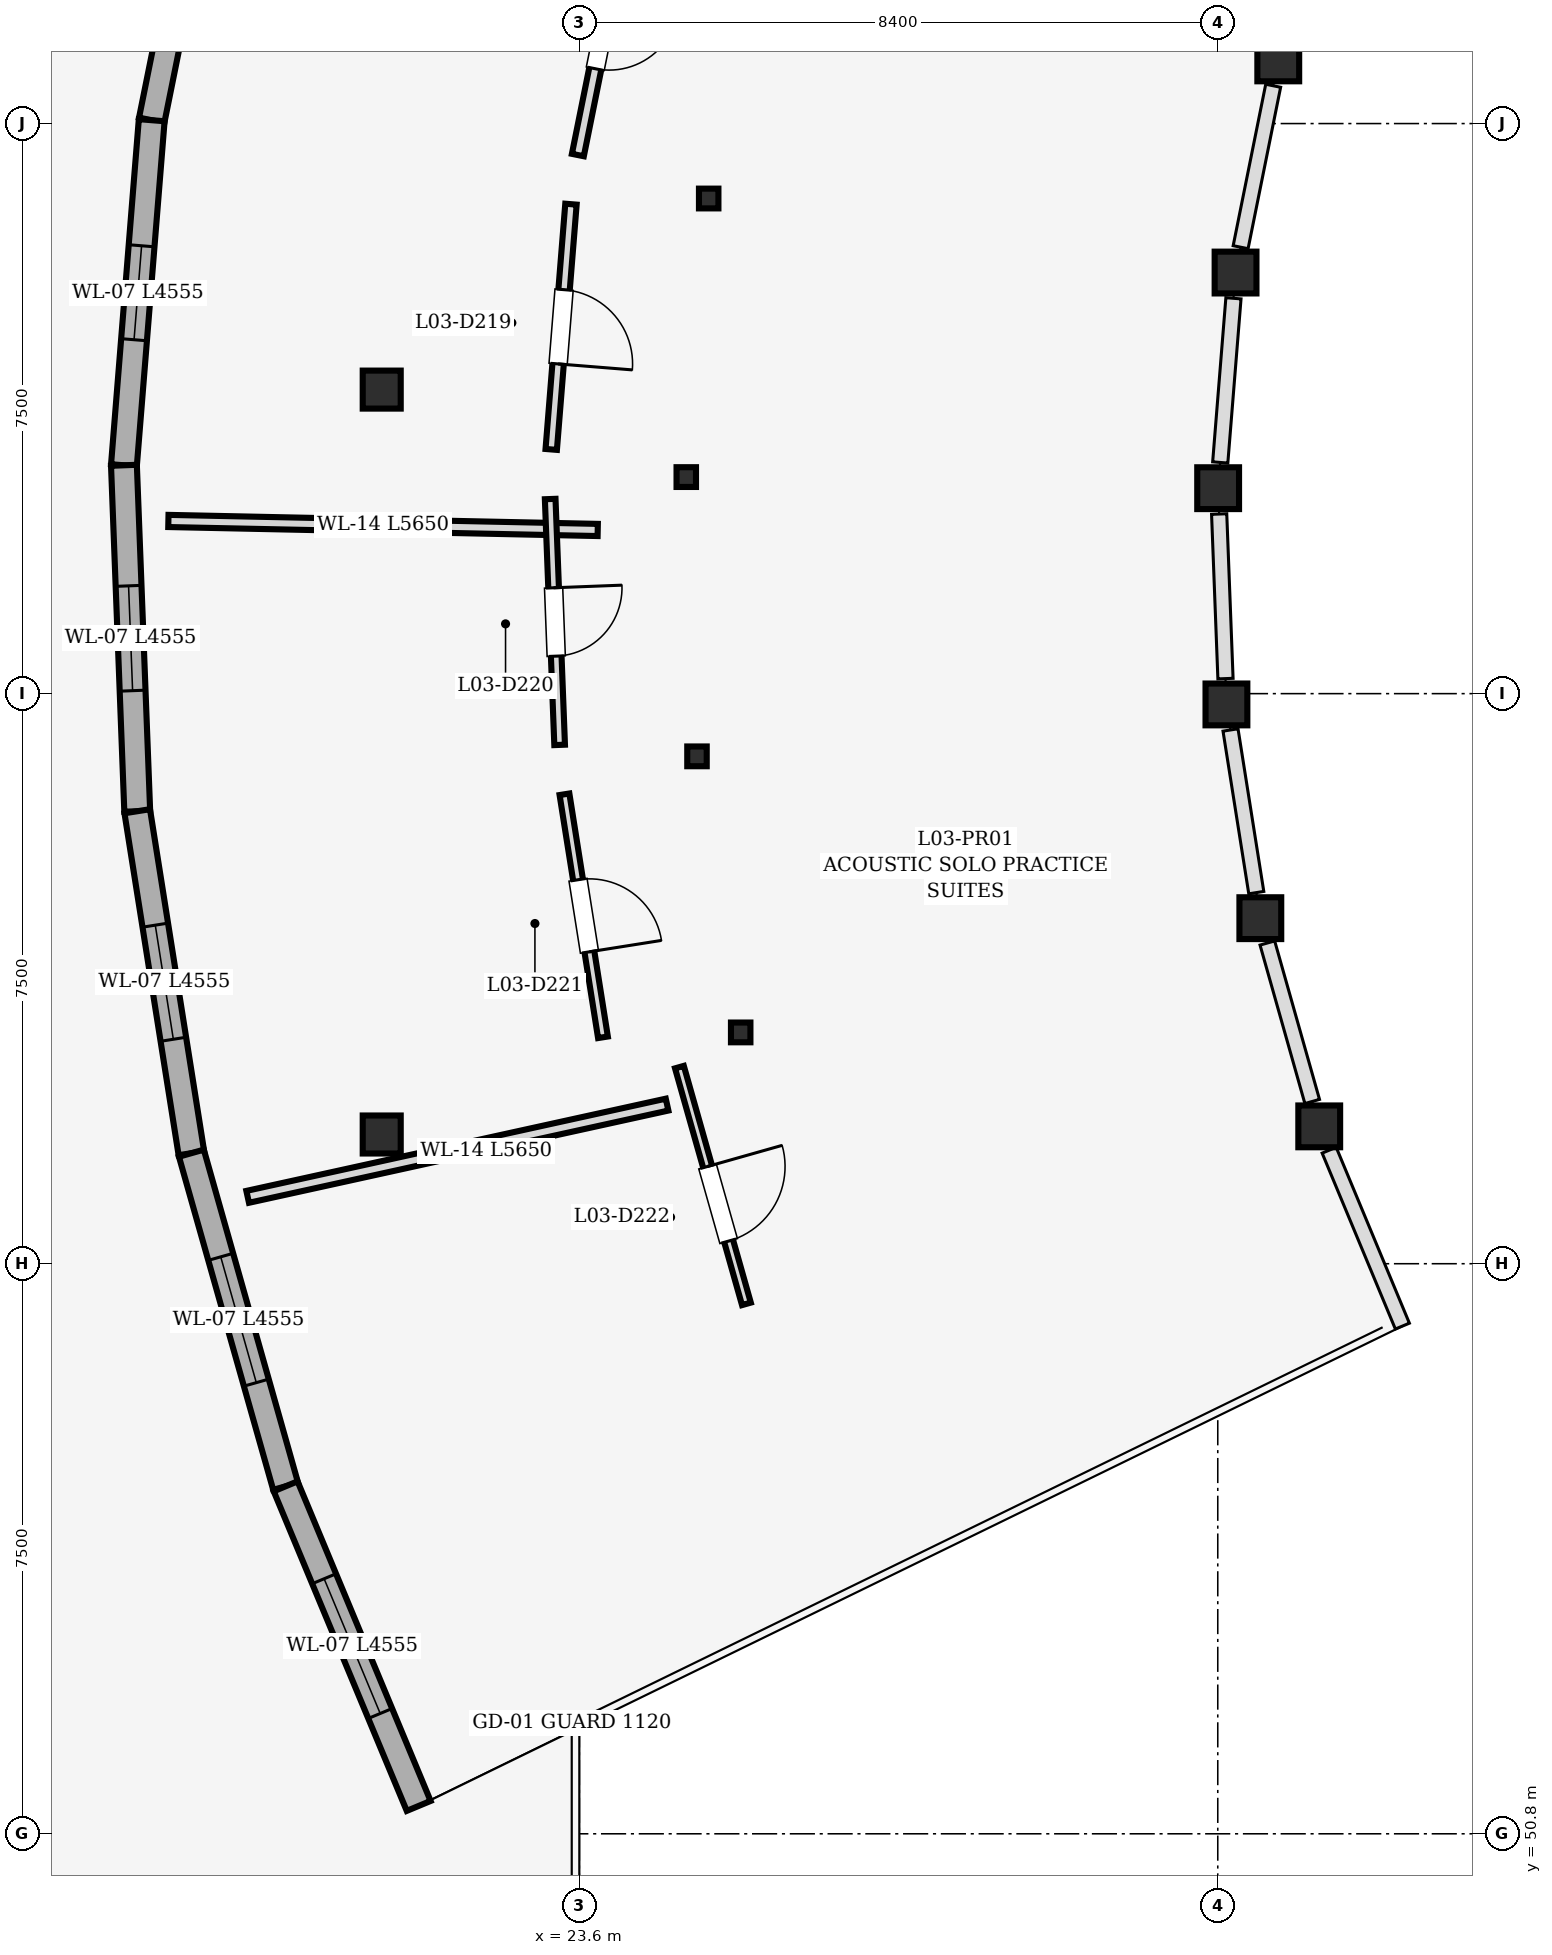
"""IFC4 building model, lengths in metres.
Left out: names, types, materials, properties, quantities, classifications, styles, units other than length and angle.
Written with IfcOpenShell. Run it as: python <this file> out.ifc"""

import sys

from ifc_helpers import new_model, si_unit, direction, frame, frame_2d, origin, origin_2d, place, context, subcontext, project, spatial, rectangle, i_section, extrude, element, fill, save


model = new_model("IFC4")
c1 = context("Model", 3, precision=1e-05, world=origin(), true_north=direction((0.0, 1.0)))
c2 = subcontext(c1, "Body", "Model", "MODEL_VIEW")
j1 = project(units=[si_unit("LENGTHUNIT", "METRE"), si_unit("PLANEANGLEUNIT", "RADIAN")], contexts=[c1])
p1 = place(None, origin())
s1 = spatial("IfcSite", under=j1, at=p1, CompositionType="ELEMENT")
p2 = place(p1, origin())
s2 = spatial("IfcBuilding", under=s1, at=p2, CompositionType="ELEMENT")
p3 = place(p2, frame((0.0, 0.0, 10.2)))
s3 = spatial("IfcBuildingStorey", under=s2, at=p3, CompositionType="ELEMENT", Elevation=10.2)
for number, where, z_axis, x_axis in (
    (1, (32.796, 74.131, 0.0), (0.0, 0.0, 1.0), (1.0, 0.0, 0.0)),
    (2, (32.234, 71.34, 0.0), (0.0, 0.0, 1.0), (1.0, 0.0, 0.0)),
):
    element("IfcColumn", number, at=place(p3, frame(where, z_axis=z_axis, x_axis=x_axis)), inside=s3, PredefinedType="COLUMN", context=c2, shape_type="SweptSolid", body=[
        extrude(rectangle(XDim=0.55, YDim=0.55, at=origin_2d()), origin(), (0.0, 0.0, 1.0), 4.5),
    ])
p4 = place(p3, frame((25.302, 72.314, 0.0), z_axis=(0.0, 0.0, 1.0), x_axis=(1.0, 0.0, 0.0)))
e3 = element("IfcColumn", 3, at=p4, inside=s3, PredefinedType="COLUMN", context=c2, shape_type="SweptSolid", body=[
    extrude(i_section(OverallWidth=0.256, OverallDepth=0.26, WebThickness=0.01, FlangeThickness=0.017, at=origin_2d()), origin(), (0.0, 0.0, 1.0), 4.5),
])
p5 = place(p3, frame((32.005, 68.503, 0.0), z_axis=(0.0, 0.0, 1.0), x_axis=(1.0, 0.0, 0.0)))
e4 = element("IfcColumn", 4, at=p5, inside=s3, PredefinedType="COLUMN", context=c2, shape_type="SweptSolid", body=[
    extrude(rectangle(XDim=0.55, YDim=0.55, at=origin_2d()), origin(), (0.0, 0.0, 1.0), 4.5),
])
p6 = place(p3, frame((25.007, 68.649, 0.0), z_axis=(0.0, 0.0, 1.0), x_axis=(1.0, 0.0, 0.0)))
e5 = element("IfcColumn", 5, at=p6, inside=s3, PredefinedType="COLUMN", context=c2, shape_type="SweptSolid", body=[
    extrude(i_section(OverallWidth=0.256, OverallDepth=0.26, WebThickness=0.01, FlangeThickness=0.017, at=origin_2d()), origin(), (0.0, 0.0, 1.0), 4.5),
])
p7 = place(p3, frame((32.114, 65.658, 0.0), z_axis=(0.0, 0.0, 1.0), x_axis=(1.0, 0.0, 0.0)))
e6 = element("IfcColumn", 6, at=p7, inside=s3, PredefinedType="COLUMN", context=c2, shape_type="SweptSolid", body=[
    extrude(rectangle(XDim=0.55, YDim=0.55, at=origin_2d()), origin(), (0.0, 0.0, 1.0), 4.5),
])
p8 = place(p3, frame((25.148, 64.975, 0.0), z_axis=(0.0, 0.0, 1.0), x_axis=(1.0, 0.0, 0.0)))
e7 = element("IfcColumn", 7, at=p8, inside=s3, PredefinedType="COLUMN", context=c2, shape_type="SweptSolid", body=[
    extrude(i_section(OverallWidth=0.256, OverallDepth=0.26, WebThickness=0.01, FlangeThickness=0.017, at=origin_2d()), origin(), (0.0, 0.0, 1.0), 4.5),
])
p9 = place(p3, frame((32.56, 62.846, 0.0), z_axis=(0.0, 0.0, 1.0), x_axis=(1.0, 0.0, 0.0)))
e8 = element("IfcColumn", 8, at=p9, inside=s3, PredefinedType="COLUMN", context=c2, shape_type="SweptSolid", body=[
    extrude(rectangle(XDim=0.55, YDim=0.55, at=origin_2d()), origin(), (0.0, 0.0, 1.0), 4.5),
])
p10 = place(p3, frame((25.723, 61.343, 0.0), z_axis=(0.0, 0.0, 1.0), x_axis=(1.0, 0.0, 0.0)))
e9 = element("IfcColumn", 9, at=p10, inside=s3, PredefinedType="COLUMN", context=c2, shape_type="SweptSolid", body=[
    extrude(i_section(OverallWidth=0.256, OverallDepth=0.26, WebThickness=0.01, FlangeThickness=0.017, at=origin_2d()), origin(), (0.0, 0.0, 1.0), 4.5),
])
p11 = place(p3, frame((33.335, 60.107, 0.0), z_axis=(0.0, 0.0, 1.0), x_axis=(1.0, 0.0, 0.0)))
e10 = element("IfcColumn", 10, at=p11, inside=s3, PredefinedType="COLUMN", context=c2, shape_type="SweptSolid", body=[
    extrude(rectangle(XDim=0.55, YDim=0.55, at=origin_2d()), origin(), (0.0, 0.0, 1.0), 4.5),
])
for number, where, z_axis, x_axis in (
    (11, (21.0, 60.0, 0.0), (0.0, 0.0, 1.0), (1.0, 0.0, 0.0)),
    (12, (21.0, 69.8, 0.0), (0.0, 0.0, 1.0), (1.0, 0.0, 0.0)),
):
    element("IfcColumn", number, at=place(p3, frame(where, z_axis=z_axis, x_axis=x_axis)), inside=s3, PredefinedType="COLUMN", context=c2, shape_type="SweptSolid", body=[
        extrude(rectangle(XDim=0.5, YDim=0.5, at=origin_2d()), origin(), (0.0, 0.0, 1.0), 4.5),
    ])
p12 = place(p3, frame((18.874, 77.809, 0.0), z_axis=(0.0, 0.0, 1.0), x_axis=(-0.197682700785, -0.980266060726, 0.0)))
e13 = element("IfcWall", 13, at=p12, inside=s3, PredefinedType="STANDARD", context=c2, shape_type="SweptSolid", body=[
    extrude(rectangle(XDim=4.555, YDim=0.34, at=frame_2d((2.277, 0.0))), origin(), (0.0, 0.0, 1.0), 4.225),
])
p13 = place(p12, frame((1.717, 0.0, 0.85)))
e14 = element("IfcOpeningElement", 14, at=p13, cuts=e13, PredefinedType="OPENING", context=c2, shape_type="SweptSolid", body=[
    extrude(rectangle(XDim=1.12, YDim=1.75, at=frame_2d((0.56, 0.875))), frame((0.0, 0.182, 0.0), z_axis=(0.0, -1.0, 0.0), x_axis=(1.0, 0.0, 0.0)), (0.0, 0.0, 1.0), 0.364),
])
p14 = place(p3, frame((17.974, 73.344, 0.0), z_axis=(0.0, 0.0, 1.0), x_axis=(-0.080188345633, -0.996779729541, 0.0)))
e15 = element("IfcWall", 15, at=p14, inside=s3, PredefinedType="STANDARD", context=c2, shape_type="SweptSolid", body=[
    extrude(rectangle(XDim=4.555, YDim=0.34, at=frame_2d((2.277, 0.0))), origin(), (0.0, 0.0, 1.0), 4.225),
])
p15 = place(p14, frame((1.657, 0.0, 0.85)))
e16 = element("IfcOpeningElement", 16, at=p15, cuts=e15, PredefinedType="OPENING", context=c2, shape_type="SweptSolid", body=[
    extrude(rectangle(XDim=1.24, YDim=1.75, at=frame_2d((0.62, 0.875))), frame((0.0, 0.182, 0.0), z_axis=(0.0, -1.0, 0.0), x_axis=(1.0, 0.0, 0.0)), (0.0, 0.0, 1.0), 0.364),
])
p16 = place(p3, frame((17.608, 68.804, 0.0), z_axis=(0.0, 0.0, 1.0), x_axis=(0.038377542804, -0.999263310749, 0.0)))
e17 = element("IfcWall", 17, at=p16, inside=s3, PredefinedType="STANDARD", context=c2, shape_type="SweptSolid", body=[
    extrude(rectangle(XDim=4.555, YDim=0.34, at=frame_2d((2.277, 0.0))), origin(), (0.0, 0.0, 1.0), 4.225),
])
p17 = place(p16, frame((1.587, 0.0, 0.85)))
e18 = element("IfcOpeningElement", 18, at=p17, cuts=e17, PredefinedType="OPENING", context=c2, shape_type="SweptSolid", body=[
    extrude(rectangle(XDim=1.38, YDim=1.75, at=frame_2d((0.69, 0.875))), frame((0.0, 0.182, 0.0), z_axis=(0.0, -1.0, 0.0), x_axis=(1.0, 0.0, 0.0)), (0.0, 0.0, 1.0), 0.364),
])
p18 = place(p3, frame((17.783, 64.253, 0.0), z_axis=(0.0, 0.0, 1.0), x_axis=(0.156466273676, -0.987683302077, 0.0)))
e19 = element("IfcWall", 19, at=p18, inside=s3, PredefinedType="STANDARD", context=c2, shape_type="SweptSolid", body=[
    extrude(rectangle(XDim=4.555, YDim=0.34, at=frame_2d((2.277, 0.0))), origin(), (0.0, 0.0, 1.0), 4.225),
])
p19 = place(p18, frame((1.517, 0.0, 0.85)))
e20 = element("IfcOpeningElement", 20, at=p19, cuts=e19, PredefinedType="OPENING", context=c2, shape_type="SweptSolid", body=[
    extrude(rectangle(XDim=1.52, YDim=1.75, at=frame_2d((0.76, 0.875))), frame((0.0, 0.182, 0.0), z_axis=(0.0, -1.0, 0.0), x_axis=(1.0, 0.0, 0.0)), (0.0, 0.0, 1.0), 0.364),
])
p20 = place(p3, frame((18.496, 59.754, 0.0), z_axis=(0.0, 0.0, 1.0), x_axis=(0.272249427892, -0.962226713936, 0.0)))
e21 = element("IfcWall", 21, at=p20, inside=s3, PredefinedType="STANDARD", context=c2, shape_type="SweptSolid", body=[
    extrude(rectangle(XDim=4.555, YDim=0.34, at=frame_2d((2.277, 0.0))), origin(), (0.0, 0.0, 1.0), 4.225),
])
p21 = place(p20, frame((1.417, 0.0, 0.85)))
e22 = element("IfcOpeningElement", 22, at=p21, cuts=e21, PredefinedType="OPENING", context=c2, shape_type="SweptSolid", body=[
    extrude(rectangle(XDim=1.72, YDim=1.75, at=frame_2d((0.86, 0.875))), frame((0.0, 0.182, 0.0), z_axis=(0.0, -1.0, 0.0), x_axis=(1.0, 0.0, 0.0)), (0.0, 0.0, 1.0), 0.364),
])
p22 = place(p3, frame((19.736, 55.372, 0.0), z_axis=(0.0, 0.0, 1.0), x_axis=(0.384310891198, -0.923203736402, 0.0)))
e23 = element("IfcWall", 23, at=p22, inside=s3, PredefinedType="STANDARD", context=c2, shape_type="SweptSolid", body=[
    extrude(rectangle(XDim=4.555, YDim=0.34, at=frame_2d((2.277, 0.0))), origin(), (0.0, 0.0, 1.0), 3.527),
])
p23 = place(p22, frame((1.317, 0.0, 0.85)))
e24 = element("IfcOpeningElement", 24, at=p23, cuts=e23, PredefinedType="OPENING", context=c2, shape_type="SweptSolid", body=[
    extrude(rectangle(XDim=1.92, YDim=1.75, at=frame_2d((0.96, 0.875))), frame((0.0, 0.182, 0.0), z_axis=(0.0, -1.0, 0.0), x_axis=(1.0, 0.0, 0.0)), (0.0, 0.0, 1.0), 0.364),
])
p24 = place(p3, frame((23.842, 67.953, 0.0), z_axis=(0.0, 0.0, 1.0), x_axis=(-0.999780386636, 0.020956586028, 0.0)))
e25 = element("IfcWall", 25, at=p24, inside=s3, PredefinedType="PARTITIONING", context=c2, shape_type="SweptSolid", body=[
    extrude(rectangle(XDim=5.65, YDim=0.16, at=frame_2d((2.825, 0.0))), origin(), (0.0, 0.0, 1.0), 4.225),
])
p25 = place(p3, frame((24.755, 60.393, 0.0), z_axis=(0.0, 0.0, 1.0), x_axis=(-0.976668579504, -0.214752149721, 0.0)))
e26 = element("IfcWall", 26, at=p25, inside=s3, PredefinedType="PARTITIONING", context=c2, shape_type="SweptSolid", body=[
    extrude(rectangle(XDim=5.65, YDim=0.16, at=frame_2d((2.825, 0.0))), origin(), (0.0, 0.0, 1.0), 3.527),
])
p26 = place(p3, frame((24.22, 76.059, 0.0), z_axis=(0.0, 0.0, 1.0), x_axis=(-0.197609875313, -0.980280744062, 0.0)))
e27 = element("IfcWall", 27, at=p26, inside=s3, PredefinedType="PARTITIONING", context=c2, shape_type="SweptSolid", body=[
    extrude(rectangle(XDim=3.237, YDim=0.16, at=frame_2d((1.618, 0.0))), origin(), (0.0, 0.0, 1.0), 4.225),
])
p27 = place(p26, frame((1.158, 0.0, 0.0)))
e28 = element("IfcOpeningElement", 28, at=p27, cuts=e27, PredefinedType="OPENING", context=c2, shape_type="SweptSolid", body=[
    extrude(rectangle(XDim=0.92, YDim=2.1, at=frame_2d((0.46, 1.05))), frame((0.0, 0.092, 0.0), z_axis=(0.0, -1.0, 0.0), x_axis=(1.0, 0.0, 0.0)), (0.0, 0.0, 1.0), 0.184),
])
p28 = place(p3, frame((23.49, 72.24, 0.0), z_axis=(0.0, 0.0, 1.0), x_axis=(-0.080248823667, -0.996774862394, 0.0)))
e29 = element("IfcWall", 29, at=p28, inside=s3, PredefinedType="PARTITIONING", context=c2, shape_type="SweptSolid", body=[
    extrude(rectangle(XDim=3.237, YDim=0.15, at=frame_2d((1.619, 0.0))), origin(), (0.0, 0.0, 1.0), 4.225),
])
p29 = place(p28, frame((1.128, 0.0, 0.0)))
e30 = element("IfcOpeningElement", 30, at=p29, cuts=e29, PredefinedType="OPENING", context=c2, shape_type="SweptSolid", body=[
    extrude(rectangle(XDim=0.98, YDim=2.15, at=frame_2d((0.49, 1.075))), frame((0.0, 0.087, 0.0), z_axis=(0.0, -1.0, 0.0), x_axis=(1.0, 0.0, 0.0)), (0.0, 0.0, 1.0), 0.174),
])
p30 = place(p3, frame((23.217, 68.36, 0.0), z_axis=(0.0, 0.0, 1.0), x_axis=(0.038386780722, -0.999262955916, 0.0)))
e31 = element("IfcWall", 31, at=p30, inside=s3, PredefinedType="PARTITIONING", context=c2, shape_type="SweptSolid", body=[
    extrude(rectangle(XDim=3.237, YDim=0.14, at=frame_2d((1.619, 0.0))), origin(), (0.0, 0.0, 1.0), 4.225),
])
p31 = place(p30, frame((1.168, 0.0, 0.0)))
e32 = element("IfcOpeningElement", 32, at=p31, cuts=e31, PredefinedType="OPENING", context=c2, shape_type="SweptSolid", body=[
    extrude(rectangle(XDim=0.9, YDim=2.1, at=frame_2d((0.45, 1.05))), frame((0.0, 0.082, 0.0), z_axis=(0.0, -1.0, 0.0), x_axis=(1.0, 0.0, 0.0)), (0.0, 0.0, 1.0), 0.164),
])
p32 = place(p3, frame((23.405, 64.476, 0.0), z_axis=(0.0, 0.0, 1.0), x_axis=(0.156419556763, -0.987690701719, 0.0)))
e33 = element("IfcWall", 33, at=p32, inside=s3, PredefinedType="PARTITIONING", context=c2, shape_type="SweptSolid", body=[
    extrude(rectangle(XDim=3.237, YDim=0.13, at=frame_2d((1.619, 0.0))), origin(), (0.0, 0.0, 1.0), 4.225),
])
p33 = place(p32, frame((1.138, 0.0, 0.0)))
e34 = element("IfcOpeningElement", 34, at=p33, cuts=e33, PredefinedType="OPENING", context=c2, shape_type="SweptSolid", body=[
    extrude(rectangle(XDim=0.96, YDim=2.18, at=frame_2d((0.48, 1.09))), frame((0.0, 0.077, 0.0), z_axis=(0.0, -1.0, 0.0), x_axis=(1.0, 0.0, 0.0)), (0.0, 0.0, 1.0), 0.154),
])
p34 = place(p3, frame((24.917, 60.886, 0.0), z_axis=(0.0, 0.0, 1.0), x_axis=(0.272269765162, -0.96222095954, 0.0)))
e35 = element("IfcWall", 35, at=p34, inside=s3, PredefinedType="PARTITIONING", context=c2, shape_type="SweptSolid", body=[
    extrude(rectangle(XDim=3.237, YDim=0.12, at=frame_2d((1.619, 0.0))), origin(), (0.0, 0.0, 1.0), 4.225),
])
p35 = place(p34, frame((1.358, 0.0, 0.0)))
e36 = element("IfcOpeningElement", 36, at=p35, cuts=e35, PredefinedType="OPENING", context=c2, shape_type="SweptSolid", body=[
    extrude(rectangle(XDim=1.02, YDim=2.22, at=frame_2d((0.51, 1.11))), frame((0.0, 0.072, 0.0), z_axis=(0.0, -1.0, 0.0), x_axis=(1.0, 0.0, 0.0)), (0.0, 0.0, 1.0), 0.144),
])
p36 = place(p15, origin())
e37 = element("IfcWindow", 37, at=p36, inside=s3, PartitioningType="DOUBLE_PANEL_VERTICAL", PredefinedType="WINDOW", context=c2, shape_type="SweptSolid", body=[
    extrude(rectangle(XDim=1.24, YDim=1.75, at=frame_2d((0.62, 0.875))), frame((0.0, 0.03, 0.0), z_axis=(0.0, -1.0, 0.0), x_axis=(1.0, 0.0, 0.0)), (0.0, 0.0, 1.0), 0.06),
])
fill(e16, e37)
p37 = place(p17, origin())
e38 = element("IfcWindow", 38, at=p37, inside=s3, PartitioningType="DOUBLE_PANEL_VERTICAL", PredefinedType="WINDOW", context=c2, shape_type="SweptSolid", body=[
    extrude(rectangle(XDim=1.38, YDim=1.75, at=frame_2d((0.69, 0.875))), frame((0.0, 0.03, 0.0), z_axis=(0.0, -1.0, 0.0), x_axis=(1.0, 0.0, 0.0)), (0.0, 0.0, 1.0), 0.06),
])
fill(e18, e38)
p38 = place(p19, origin())
e39 = element("IfcWindow", 39, at=p38, inside=s3, PartitioningType="DOUBLE_PANEL_VERTICAL", PredefinedType="WINDOW", context=c2, shape_type="SweptSolid", body=[
    extrude(rectangle(XDim=1.52, YDim=1.75, at=frame_2d((0.76, 0.875))), frame((0.0, 0.03, 0.0), z_axis=(0.0, -1.0, 0.0), x_axis=(1.0, 0.0, 0.0)), (0.0, 0.0, 1.0), 0.06),
])
fill(e20, e39)
p39 = place(p21, origin())
e40 = element("IfcWindow", 40, at=p39, inside=s3, PartitioningType="DOUBLE_PANEL_VERTICAL", PredefinedType="WINDOW", context=c2, shape_type="SweptSolid", body=[
    extrude(rectangle(XDim=1.72, YDim=1.75, at=frame_2d((0.86, 0.875))), frame((0.0, 0.03, 0.0), z_axis=(0.0, -1.0, 0.0), x_axis=(1.0, 0.0, 0.0)), (0.0, 0.0, 1.0), 0.06),
])
fill(e22, e40)
p40 = place(p23, origin())
e41 = element("IfcWindow", 41, at=p40, inside=s3, PartitioningType="DOUBLE_PANEL_VERTICAL", PredefinedType="WINDOW", context=c2, shape_type="SweptSolid", body=[
    extrude(rectangle(XDim=1.92, YDim=1.75, at=frame_2d((0.96, 0.875))), frame((0.0, 0.03, 0.0), z_axis=(0.0, -1.0, 0.0), x_axis=(1.0, 0.0, 0.0)), (0.0, 0.0, 1.0), 0.06),
])
fill(e24, e41)
p41 = place(p27, origin())
e42 = element("IfcDoor", 42, at=p41, inside=s3, OperationType="SINGLE_SWING_LEFT", PredefinedType="DOOR", context=c2, shape_type="SweptSolid", body=[
    extrude(rectangle(XDim=0.92, YDim=2.1, at=frame_2d((0.46, 1.05))), frame((0.0, 0.025, 0.0), z_axis=(0.0, -1.0, 0.0), x_axis=(1.0, 0.0, 0.0)), (0.0, 0.0, 1.0), 0.05),
])
fill(e28, e42)
p42 = place(p29, origin())
e43 = element("IfcDoor", 43, at=p42, inside=s3, OperationType="SINGLE_SWING_RIGHT", PredefinedType="DOOR", context=c2, shape_type="SweptSolid", body=[
    extrude(rectangle(XDim=0.98, YDim=2.15, at=frame_2d((0.49, 1.075))), frame((0.0, 0.025, 0.0), z_axis=(0.0, -1.0, 0.0), x_axis=(1.0, 0.0, 0.0)), (0.0, 0.0, 1.0), 0.05),
])
fill(e30, e43)
p43 = place(p31, origin())
e44 = element("IfcDoor", 44, at=p43, inside=s3, OperationType="SINGLE_SWING_LEFT", PredefinedType="DOOR", context=c2, shape_type="SweptSolid", body=[
    extrude(rectangle(XDim=0.9, YDim=2.1, at=frame_2d((0.45, 1.05))), frame((0.0, 0.025, 0.0), z_axis=(0.0, -1.0, 0.0), x_axis=(1.0, 0.0, 0.0)), (0.0, 0.0, 1.0), 0.05),
])
fill(e32, e44)
p44 = place(p33, origin())
e45 = element("IfcDoor", 45, at=p44, inside=s3, OperationType="SINGLE_SWING_RIGHT", PredefinedType="DOOR", context=c2, shape_type="SweptSolid", body=[
    extrude(rectangle(XDim=0.96, YDim=2.18, at=frame_2d((0.48, 1.09))), frame((0.0, 0.025, 0.0), z_axis=(0.0, -1.0, 0.0), x_axis=(1.0, 0.0, 0.0)), (0.0, 0.0, 1.0), 0.05),
])
fill(e34, e45)
p45 = place(p35, origin())
e46 = element("IfcDoor", 46, at=p45, inside=s3, OperationType="SINGLE_SWING_LEFT", PredefinedType="DOOR", context=c2, shape_type="SweptSolid", body=[
    extrude(rectangle(XDim=1.02, YDim=2.22, at=frame_2d((0.51, 1.11))), frame((0.0, 0.025, 0.0), z_axis=(0.0, -1.0, 0.0), x_axis=(1.0, 0.0, 0.0)), (0.0, 0.0, 1.0), 0.05),
])
fill(e36, e46)
save(model, sys.argv[1])
